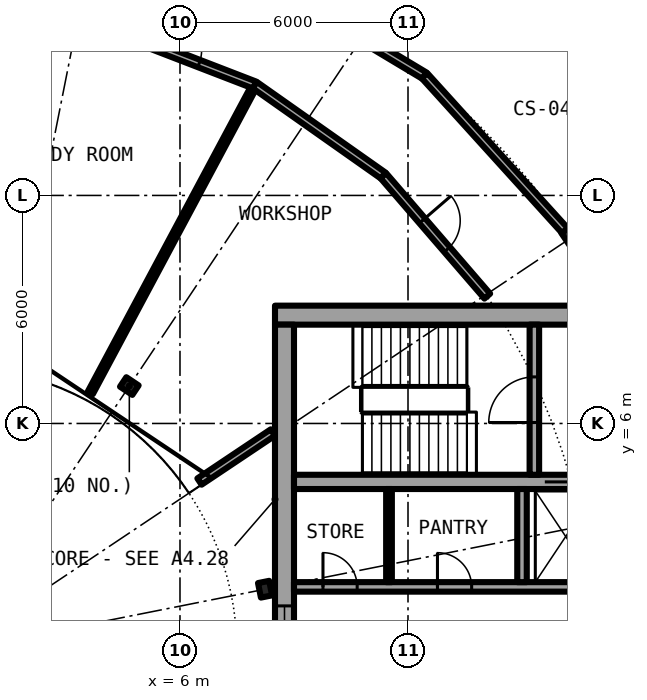
"""IFC4 building model, lengths in metres.
Left out: names, types, materials, properties, quantities, classifications, styles, units other than length and angle.
Written with IfcOpenShell. Run it as: python <this file> out.ifc"""

import sys

from ifc_helpers import new_model, si_unit, direction, frame, frame_2d, origin, origin_2d, place, context, subcontext, project, spatial, rectangle, i_section, extrude, element, fill, save


model = new_model("IFC4")
c1 = context("Model", 3, precision=1e-05, world=origin(), true_north=direction((0.0, 1.0)))
c2 = subcontext(c1, "Body", "Model", "MODEL_VIEW")
j1 = project(units=[si_unit("LENGTHUNIT", "METRE"), si_unit("PLANEANGLEUNIT", "RADIAN")], contexts=[c1])
p1 = place(None, origin())
s1 = spatial("IfcSite", under=j1, at=p1, CompositionType="ELEMENT")
p2 = place(p1, origin())
s2 = spatial("IfcBuilding", under=s1, at=p2, CompositionType="ELEMENT")
p3 = place(p2, frame((0.0, 0.0, 157.4)))
s3 = spatial("IfcBuildingStorey", under=s2, at=p3, CompositionType="ELEMENT", Elevation=157.4)
p4 = place(p3, frame((16.297, 10.889, 0.0), z_axis=(0.0, 0.0, 1.0), x_axis=(0.831469612303, 0.55557023302, 0.0)))
e1 = element("IfcColumn", 1, at=p4, inside=s3, PredefinedType="COLUMN", context=c2, shape_type="SweptSolid", body=[
    extrude(i_section(OverallWidth=0.3, OverallDepth=0.5, WebThickness=0.014, FlangeThickness=0.028, FilletRadius=0.027, at=origin_2d()), origin(), (0.0, 0.0, 1.0), 4.2),
])
for number, where, z_axis, x_axis in (
    (2, (8.239, 1.639, 0.0), (0.0, 0.0, 1.0), (0.981, 0.195, 0.0)),
    (3, (4.667, 6.984, 0.0), (0.0, 0.0, 1.0), (0.556, 0.831, 0.0)),
):
    element("IfcColumn", number, at=place(p3, frame(where, z_axis=z_axis, x_axis=x_axis)), inside=s3, PredefinedType="COLUMN", context=c2, shape_type="SweptSolid", body=[
        extrude(i_section(OverallWidth=0.3, OverallDepth=0.39, WebThickness=0.011, FlangeThickness=0.019, FilletRadius=0.027, at=origin_2d()), origin(), (0.0, 0.0, 1.0), 4.2),
    ])
p5 = place(p3, frame((22.1, 8.85, 0.0), z_axis=(0.0, 0.0, 1.0), x_axis=(-1.0, 0.0, 0.0)))
e4 = element("IfcWall", 4, at=p5, inside=s3, PredefinedType="SHEAR", context=c2, shape_type="SweptSolid", body=[
    extrude(rectangle(XDim=13.6, YDim=0.5, at=frame_2d((6.8, 0.0))), origin(), (0.0, 0.0, 1.0), 4.2),
])
p6 = place(p5, frame((1.025, 0.0, 0.0)))
e5 = element("IfcOpeningElement", 5, at=p6, cuts=e4, PredefinedType="OPENING", context=c2, shape_type="SweptSolid", body=[
    extrude(rectangle(XDim=1.2, YDim=2.3, at=frame_2d((0.6, 1.15))), frame((0.0, 0.26, 0.0), z_axis=(0.0, -1.0, 0.0), x_axis=(1.0, 0.0, 0.0)), (0.0, 0.0, 1.0), 0.52),
])
p7 = place(p3, frame((8.75, -8.6, 0.0), z_axis=(0.0, 0.0, 1.0), x_axis=(0.0, 1.0, 0.0)))
e6 = element("IfcWall", 6, at=p7, inside=s3, PredefinedType="SHEAR", context=c2, shape_type="SweptSolid", body=[
    extrude(rectangle(XDim=17.2, YDim=0.5, at=frame_2d((8.6, 0.0))), origin(), (0.0, 0.0, 1.0), 4.2),
])
p8 = place(p7, frame((7.4, 0.0, 0.1)))
e7 = element("IfcOpeningElement", 7, at=p8, cuts=e6, PredefinedType="OPENING", context=c2, shape_type="SweptSolid", body=[
    extrude(rectangle(XDim=2.4, YDim=2.2, at=frame_2d((1.2, 1.1))), frame((0.0, 0.26, 0.0), z_axis=(0.0, -1.0, 0.0), x_axis=(1.0, 0.0, 0.0)), (0.0, 0.0, 1.0), 0.52),
])
p9 = place(p3, frame((9.0, 1.7, 0.0), z_axis=(0.0, 0.0, 1.0), x_axis=(1.0, 0.0, 0.0)))
e8 = element("IfcWall", 8, at=p9, inside=s3, PredefinedType="SHEAR", context=c2, shape_type="SweptSolid", body=[
    extrude(rectangle(XDim=10.15, YDim=0.25, at=frame_2d((5.075, 0.0))), origin(), (0.0, 0.0, 1.0), 4.2),
])
p10 = place(p9, frame((0.762, 0.0, 0.0)))
e9 = element("IfcOpeningElement", 9, at=p10, cuts=e8, PredefinedType="OPENING", context=c2, shape_type="SweptSolid", body=[
    extrude(rectangle(XDim=0.9, YDim=2.3, at=frame_2d((0.45, 1.15))), frame((0.0, 0.135, 0.0), z_axis=(0.0, -1.0, 0.0), x_axis=(1.0, 0.0, 0.0)), (0.0, 0.0, 1.0), 0.27),
])
p11 = place(p9, frame((3.775, 0.0, 0.0)))
e10 = element("IfcOpeningElement", 10, at=p11, cuts=e8, PredefinedType="OPENING", context=c2, shape_type="SweptSolid", body=[
    extrude(rectangle(XDim=0.9, YDim=2.3, at=frame_2d((0.45, 1.15))), frame((0.0, 0.135, 0.0), z_axis=(0.0, -1.0, 0.0), x_axis=(1.0, 0.0, 0.0)), (0.0, 0.0, 1.0), 0.27),
])
p12 = place(p9, frame((8.837, 0.0, 0.0)))
e11 = element("IfcOpeningElement", 11, at=p12, cuts=e8, PredefinedType="OPENING", context=c2, shape_type="SweptSolid", body=[
    extrude(rectangle(XDim=0.9, YDim=2.3, at=frame_2d((0.45, 1.15))), frame((0.0, 0.135, 0.0), z_axis=(0.0, -1.0, 0.0), x_axis=(1.0, 0.0, 0.0)), (0.0, 0.0, 1.0), 0.27),
])
p13 = place(p3, frame((9.0, 4.462, 0.0), z_axis=(0.0, 0.0, 1.0), x_axis=(1.0, 0.0, 0.0)))
e12 = element("IfcWall", 12, at=p13, inside=s3, PredefinedType="SHEAR", context=c2, shape_type="SweptSolid", body=[
    extrude(rectangle(XDim=10.15, YDim=0.375, at=frame_2d((5.075, 0.0))), origin(), (0.0, 0.0, 1.0), 4.2),
])
p14 = place(p13, frame((6.6, 0.0, 0.0)))
e13 = element("IfcOpeningElement", 13, at=p14, cuts=e12, PredefinedType="OPENING", context=c2, shape_type="SweptSolid", body=[
    extrude(rectangle(XDim=1.1, YDim=2.3, at=frame_2d((0.55, 1.15))), frame((0.0, 0.198, 0.0), z_axis=(0.0, -1.0, 0.0), x_axis=(1.0, 0.0, 0.0)), (0.0, 0.0, 1.0), 0.395),
])
p15 = place(p3, frame((15.325, 4.65, 0.0), z_axis=(0.0, 0.0, 1.0), x_axis=(0.0, 1.0, 0.0)))
e14 = element("IfcWall", 14, at=p15, inside=s3, PredefinedType="SHEAR", context=c2, shape_type="SweptSolid", body=[
    extrude(rectangle(XDim=3.95, YDim=0.25, at=frame_2d((1.975, 0.0))), origin(), (0.0, 0.0, 1.0), 4.2),
])
p16 = place(p15, frame((1.375, 0.0, 0.0)))
e15 = element("IfcOpeningElement", 15, at=p16, cuts=e14, PredefinedType="OPENING", context=c2, shape_type="SweptSolid", body=[
    extrude(rectangle(XDim=1.2, YDim=2.3, at=frame_2d((0.6, 1.15))), frame((0.0, 0.135, 0.0), z_axis=(0.0, -1.0, 0.0), x_axis=(1.0, 0.0, 0.0)), (0.0, 0.0, 1.0), 0.27),
])
p17 = place(p3, frame((15.0, 1.825, 0.0), z_axis=(0.0, 0.0, 1.0), x_axis=(0.0, 1.0, 0.0)))
e16 = element("IfcWall", 16, at=p17, inside=s3, PredefinedType="SOLIDWALL", context=c2, shape_type="SweptSolid", body=[
    extrude(rectangle(XDim=2.45, YDim=0.25, at=frame_2d((1.225, 0.0))), origin(), (0.0, 0.0, 1.0), 3.85),
])
p18 = place(p3, frame((11.5, 1.825, 0.0), z_axis=(0.0, 0.0, 1.0), x_axis=(0.0, 1.0, 0.0)))
e17 = element("IfcWall", 17, at=p18, inside=s3, PredefinedType="PARTITIONING", context=c2, shape_type="SweptSolid", body=[
    extrude(rectangle(XDim=2.45, YDim=0.15, at=frame_2d((1.225, 0.0))), origin(), (0.0, 0.0, 1.0), 3.85),
])
p19 = place(p3, frame((3.641, 6.807, 0.0), z_axis=(0.0, 0.0, 1.0), x_axis=(0.471428625665, 0.881904218667, 0.0)))
e18 = element("IfcWall", 18, at=p19, inside=s3, PredefinedType="PARTITIONING", context=c2, shape_type="SweptSolid", body=[
    extrude(rectangle(XDim=9.18, YDim=0.15, at=frame_2d((4.59, 0.0))), origin(), (0.0, 0.0, 1.0), 3.85),
])
p20 = place(p3, frame((6.513, 4.472, 0.0), z_axis=(0.0, 0.0, 1.0), x_axis=(0.83133816625, 0.555766905579, 0.0)))
e19 = element("IfcWall", 19, at=p20, inside=s3, PredefinedType="PARTITIONING", context=c2, shape_type="SweptSolid", body=[
    extrude(rectangle(XDim=2.323, YDim=0.2, at=frame_2d((1.162, 0.0))), origin(), (0.0, 0.0, 1.0), 3.85),
])
p21 = place(p3, frame((4.106, 16.394, 0.0), z_axis=(0.0, 0.0, 1.0), x_axis=(0.932943640288, -0.360022449363, 0.0)))
e20 = element("IfcWall", 20, at=p21, inside=s3, PredefinedType="PARTITIONING", context=c2, shape_type="SweptSolid", body=[
    extrude(rectangle(XDim=4.139, YDim=0.2, at=frame_2d((2.069, 0.0))), origin(), (0.0, 0.0, 1.0), 3.85),
])
p22 = place(p21, frame((1.569, 0.0, 0.0)))
e21 = element("IfcOpeningElement", 21, at=p22, cuts=e20, PredefinedType="OPENING", context=c2, shape_type="SweptSolid", body=[
    extrude(rectangle(XDim=1.0, YDim=2.3, at=frame_2d((0.5, 1.15))), frame((0.0, 0.11, 0.0), z_axis=(0.0, -1.0, 0.0), x_axis=(1.0, 0.0, 0.0)), (0.0, 0.0, 1.0), 0.22),
])
p23 = place(p3, frame((7.967, 14.904, 0.0), z_axis=(0.0, 0.0, 1.0), x_axis=(0.817567680547, -0.575832517079, 0.0)))
e22 = element("IfcWall", 22, at=p23, inside=s3, PredefinedType="PARTITIONING", context=c2, shape_type="SweptSolid", body=[
    extrude(rectangle(XDim=4.137, YDim=0.2, at=frame_2d((2.068, 0.0))), origin(), (0.0, 0.0, 1.0), 3.85),
])
p24 = place(p3, frame((11.349, 12.522, 0.0), z_axis=(0.0, 0.0, 1.0), x_axis=(0.653273870261, -0.757121687996, 0.0)))
e23 = element("IfcWall", 23, at=p24, inside=s3, PredefinedType="PARTITIONING", context=c2, shape_type="SweptSolid", body=[
    extrude(rectangle(XDim=4.189, YDim=0.2, at=frame_2d((2.095, 0.0))), origin(), (0.0, 0.0, 1.0), 3.85),
])
p25 = place(p24, frame((1.569, 0.0, 0.0)))
e24 = element("IfcOpeningElement", 24, at=p25, cuts=e23, PredefinedType="OPENING", context=c2, shape_type="SweptSolid", body=[
    extrude(rectangle(XDim=1.0, YDim=2.3, at=frame_2d((0.5, 1.15))), frame((0.0, 0.11, 0.0), z_axis=(0.0, -1.0, 0.0), x_axis=(1.0, 0.0, 0.0)), (0.0, 0.0, 1.0), 0.22),
])
p26 = place(p3, frame((10.913, 16.063, 0.0), z_axis=(0.0, 0.0, 1.0), x_axis=(0.857614365469, -0.514293301668, 0.0)))
e25 = element("IfcWall", 25, at=p26, inside=s3, PredefinedType="PARTITIONING", context=c2, shape_type="SweptSolid", body=[
    extrude(rectangle(XDim=1.773, YDim=0.2, at=frame_2d((0.887, 0.0))), origin(), (0.0, 0.0, 1.0), 3.54),
])
p27 = place(p3, frame((12.434, 15.151, 0.0), z_axis=(0.0, 0.0, 1.0), x_axis=(0.671532887857, -0.740974750262, 0.0)))
e26 = element("IfcWall", 26, at=p27, inside=s3, PredefinedType="PARTITIONING", context=c2, shape_type="SweptSolid", body=[
    extrude(rectangle(XDim=5.601, YDim=0.2, at=frame_2d((2.8, 0.0))), origin(), (0.0, 0.0, 1.0), 3.54),
])
p28 = place(p14, origin())
e27 = element("IfcDoor", 27, at=p28, inside=s3, OperationType="DOUBLE_DOOR_SLIDING", PredefinedType="DOOR", context=c2, shape_type="SweptSolid", body=[
    extrude(rectangle(XDim=1.1, YDim=2.3, at=frame_2d((0.55, 1.15))), frame((0.0, 0.025, 0.0), z_axis=(0.0, -1.0, 0.0), x_axis=(1.0, 0.0, 0.0)), (0.0, 0.0, 1.0), 0.05),
])
fill(e13, e27)
p29 = place(p10, origin())
e28 = element("IfcDoor", 28, at=p29, inside=s3, OperationType="SINGLE_SWING_RIGHT", PredefinedType="DOOR", context=c2, shape_type="SweptSolid", body=[
    extrude(rectangle(XDim=0.9, YDim=2.3, at=frame_2d((0.45, 1.15))), frame((0.0, 0.025, 0.0), z_axis=(0.0, -1.0, 0.0), x_axis=(1.0, 0.0, 0.0)), (0.0, 0.0, 1.0), 0.05),
])
fill(e9, e28)
p30 = place(p11, origin())
e29 = element("IfcDoor", 29, at=p30, inside=s3, OperationType="SINGLE_SWING_RIGHT", PredefinedType="DOOR", context=c2, shape_type="SweptSolid", body=[
    extrude(rectangle(XDim=0.9, YDim=2.3, at=frame_2d((0.45, 1.15))), frame((0.0, 0.025, 0.0), z_axis=(0.0, -1.0, 0.0), x_axis=(1.0, 0.0, 0.0)), (0.0, 0.0, 1.0), 0.05),
])
fill(e10, e29)
p31 = place(p16, origin())
e30 = element("IfcDoor", 30, at=p31, inside=s3, OperationType="SINGLE_SWING_LEFT", PredefinedType="DOOR", context=c2, shape_type="SweptSolid", body=[
    extrude(rectangle(XDim=1.2, YDim=2.3, at=frame_2d((0.6, 1.15))), frame((0.0, 0.025, 0.0), z_axis=(0.0, -1.0, 0.0), x_axis=(1.0, 0.0, 0.0)), (0.0, 0.0, 1.0), 0.05),
])
fill(e15, e30)
p32 = place(p8, origin())
e31 = element("IfcWindow", 31, at=p32, inside=s3, PartitioningType="SINGLE_PANEL", PredefinedType="WINDOW", context=c2, shape_type="SweptSolid", body=[
    extrude(rectangle(XDim=2.4, YDim=2.2, at=frame_2d((1.2, 1.1))), frame((0.0, 0.03, 0.0), z_axis=(0.0, -1.0, 0.0), x_axis=(1.0, 0.0, 0.0)), (0.0, 0.0, 1.0), 0.06),
])
fill(e7, e31)
p33 = place(p25, origin())
e32 = element("IfcDoor", 32, at=p33, inside=s3, OperationType="SINGLE_SWING_LEFT", PredefinedType="DOOR", context=c2, shape_type="SweptSolid", body=[
    extrude(rectangle(XDim=1.0, YDim=2.3, at=frame_2d((0.5, 1.15))), frame((0.0, 0.025, 0.0), z_axis=(0.0, -1.0, 0.0), x_axis=(1.0, 0.0, 0.0)), (0.0, 0.0, 1.0), 0.05),
])
fill(e24, e32)
p34 = place(p22, origin())
e33 = element("IfcDoor", 33, at=p34, inside=s3, OperationType="SINGLE_SWING_LEFT", PredefinedType="DOOR", context=c2, shape_type="SweptSolid", body=[
    extrude(rectangle(XDim=1.0, YDim=2.3, at=frame_2d((0.5, 1.15))), frame((0.0, 0.025, 0.0), z_axis=(0.0, -1.0, 0.0), x_axis=(1.0, 0.0, 0.0)), (0.0, 0.0, 1.0), 0.05),
])
fill(e21, e33)
save(model, sys.argv[1])
